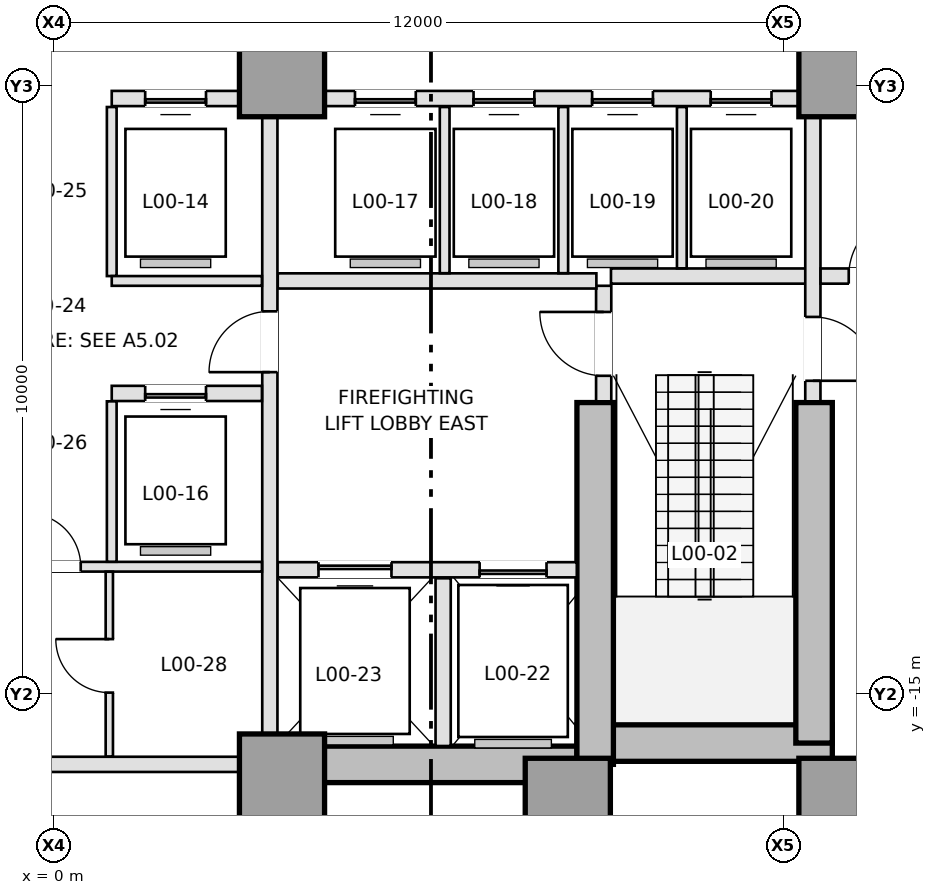
"""IFC4 building model, lengths in metres.
Left out: names, types, materials, properties, quantities, classifications, styles, units other than length and angle.
Written with IfcOpenShell. Run it as: python <this file> out.ifc"""

import sys

from ifc_helpers import new_model, si_unit, direction, frame, frame_2d, origin, origin_2d, place, context, subcontext, project, spatial, rectangle, extrude, element, fill, save


model = new_model("IFC4")
c1 = context("Model", 3, precision=1e-05, world=origin(), true_north=direction((0.0, 1.0)))
c2 = subcontext(c1, "Body", "Model", "MODEL_VIEW")
j1 = project(units=[si_unit("LENGTHUNIT", "METRE"), si_unit("PLANEANGLEUNIT", "RADIAN")], contexts=[c1])
p1 = place(None, origin())
s1 = spatial("IfcSite", under=j1, at=p1, CompositionType="ELEMENT")
p2 = place(p1, origin())
s2 = spatial("IfcBuilding", under=s1, at=p2, CompositionType="ELEMENT")
p3 = place(p2, origin())
s3 = spatial("IfcBuildingStorey", under=s2, at=p3, CompositionType="ELEMENT", Elevation=0.0)
p4 = place(p3, frame((3.75, -16.15, 0.0), z_axis=(0.0, 0.0, 1.0), x_axis=(1.0, 0.0, 0.0)))
e1 = element("IfcWall", 1, at=p4, inside=s3, PredefinedType="SHEAR", context=c2, shape_type="SweptSolid", body=[
    extrude(rectangle(XDim=5.15, YDim=0.6, at=frame_2d((2.575, 0.0))), origin(), (0.0, 0.0, 1.0), 5.0),
])
p5 = place(p3, frame((8.6, -15.8, 0.0), z_axis=(0.0, 0.0, 1.0), x_axis=(1.0, 0.0, 0.0)))
e2 = element("IfcWall", 2, at=p5, inside=s3, PredefinedType="SHEAR", context=c2, shape_type="SweptSolid", body=[
    extrude(rectangle(XDim=4.2, YDim=0.6, at=frame_2d((2.1, 0.0))), origin(), (0.0, 0.0, 1.0), 5.0),
])
p6 = place(p3, frame((12.5, -15.8, 0.0), z_axis=(0.0, 0.0, 1.0), x_axis=(0.0, 1.0, 0.0)))
e3 = element("IfcWall", 3, at=p6, inside=s3, PredefinedType="SHEAR", context=c2, shape_type="SweptSolid", body=[
    extrude(rectangle(XDim=5.6, YDim=0.6, at=frame_2d((2.8, 0.0))), origin(), (0.0, 0.0, 1.0), 5.0),
])
p7 = place(p3, frame((8.9, -16.15, 0.0), z_axis=(0.0, 0.0, 1.0), x_axis=(0.0, 1.0, 0.0)))
e4 = element("IfcWall", 4, at=p7, inside=s3, PredefinedType="SHEAR", context=c2, shape_type="SweptSolid", body=[
    extrude(rectangle(XDim=5.95, YDim=0.6, at=frame_2d((2.975, 0.0))), origin(), (0.0, 0.0, 1.0), 5.0),
])
for number, where, z_axis, x_axis in (
    (5, (3.75, -16.35, 0.0), (0.0, 0.0, 1.0), (1.0, 0.0, 0.0)),
    (6, (8.45, -16.75, 0.0), (0.0, 0.0, 1.0), (1.0, 0.0, 0.0)),
    (7, (12.95, -16.75, 0.0), (0.0, 0.0, 1.0), (1.0, 0.0, 0.0)),
    (8, (3.75, -4.8, 0.0), (0.0, 0.0, 1.0), (1.0, 0.0, 0.0)),
    (9, (12.95, -4.8, 0.0), (0.0, 0.0, 1.0), (1.0, 0.0, 0.0)),
):
    element("IfcColumn", number, at=place(p3, frame(where, z_axis=z_axis, x_axis=x_axis)), inside=s3, PredefinedType="COLUMN", context=c2, shape_type="SweptSolid", body=[
        extrude(rectangle(XDim=1.4, YDim=1.4, at=origin_2d()), origin(), (0.0, 0.0, 1.0), 5.0),
    ])
p8 = place(p3, frame((9.04, -10.18, 0.0), z_axis=(0.0, 0.0, 1.0), x_axis=(0.0, 1.0, 0.0)))
e10 = element("IfcWall", 10, at=p8, inside=s3, PredefinedType="PARTITIONING", context=c2, shape_type="SweptSolid", body=[
    extrude(rectangle(XDim=1.9, YDim=0.25, at=frame_2d((0.95, 0.0))), origin(), (0.0, 0.0, 1.0), 4.7),
])
p9 = place(p8, frame((0.42, 0.0, 0.0)))
e11 = element("IfcOpeningElement", 11, at=p9, cuts=e10, PredefinedType="OPENING", context=c2, shape_type="SweptSolid", body=[
    extrude(rectangle(XDim=1.05, YDim=2.15, at=frame_2d((0.525, 1.075))), frame((0.0, 0.135, 0.0), z_axis=(0.0, -1.0, 0.0), x_axis=(1.0, 0.0, 0.0)), (0.0, 0.0, 1.0), 0.27),
])
p10 = place(p3, frame((9.16, -8.12, 0.0), z_axis=(0.0, 0.0, 1.0), x_axis=(1.0, 0.0, 0.0)))
e12 = element("IfcWall", 12, at=p10, inside=s3, PredefinedType="PARTITIONING", context=c2, shape_type="SweptSolid", body=[
    extrude(rectangle(XDim=3.22, YDim=0.25, at=frame_2d((1.61, 0.0))), origin(), (0.0, 0.0, 1.0), 4.7),
])
p11 = place(p3, frame((12.48, -5.502, 0.0), z_axis=(0.0, 0.0, 1.0), x_axis=(0.0, -1.0, 0.0)))
e13 = element("IfcWall", 13, at=p11, inside=s3, PredefinedType="PARTITIONING", context=c2, shape_type="SweptSolid", body=[
    extrude(rectangle(XDim=4.678, YDim=0.25, at=frame_2d((2.339, 0.0))), origin(), (0.0, 0.0, 1.0), 4.7),
])
p12 = place(p11, frame((3.29, 0.0, 0.0)))
e14 = element("IfcOpeningElement", 14, at=p12, cuts=e13, PredefinedType="OPENING", context=c2, shape_type="SweptSolid", body=[
    extrude(rectangle(XDim=1.05, YDim=2.15, at=frame_2d((0.525, 1.075))), frame((0.0, 0.135, 0.0), z_axis=(0.0, -1.0, 0.0), x_axis=(1.0, 0.0, 0.0)), (0.0, 0.0, 1.0), 0.27),
])
p13 = place(p3, frame((3.68, -12.95, 0.0), z_axis=(0.0, 0.0, 1.0), x_axis=(1.0, 0.0, 0.0)))
e15 = element("IfcWall", 15, at=p13, inside=s3, PredefinedType="PARTITIONING", context=c2, shape_type="SweptSolid", body=[
    extrude(rectangle(XDim=4.918, YDim=0.25, at=frame_2d((2.459, 0.0))), origin(), (0.0, 0.0, 1.0), 4.7),
])
p14 = place(p13, frame((3.32, 0.0, 0.0)))
e16 = element("IfcOpeningElement", 16, at=p14, cuts=e15, PredefinedType="OPENING", context=c2, shape_type="SweptSolid", body=[
    extrude(rectangle(XDim=1.1, YDim=2.15, at=frame_2d((0.55, 1.075))), frame((0.0, 0.135, 0.0), z_axis=(0.0, -1.0, 0.0), x_axis=(1.0, 0.0, 0.0)), (0.0, 0.0, 1.0), 0.27),
])
p15 = place(p13, frame((0.67, 0.0, 0.0)))
e17 = element("IfcOpeningElement", 17, at=p15, cuts=e15, PredefinedType="OPENING", context=c2, shape_type="SweptSolid", body=[
    extrude(rectangle(XDim=1.2, YDim=2.15, at=frame_2d((0.6, 1.075))), frame((0.0, 0.135, 0.0), z_axis=(0.0, -1.0, 0.0), x_axis=(1.0, 0.0, 0.0)), (0.0, 0.0, 1.0), 0.27),
])
p16 = place(p3, frame((6.4, -15.848, 0.0), z_axis=(0.0, 0.0, 1.0), x_axis=(0.0, 1.0, 0.0)))
e18 = element("IfcWall", 18, at=p16, inside=s3, PredefinedType="PARTITIONING", context=c2, shape_type="SweptSolid", body=[
    extrude(rectangle(XDim=2.758, YDim=0.25, at=frame_2d((1.379, 0.0))), origin(), (0.0, 0.0, 1.0), 4.7),
])
p17 = place(p3, frame((3.68, -8.2, 0.0), z_axis=(0.0, 0.0, 1.0), x_axis=(1.0, 0.0, 0.0)))
e19 = element("IfcWall", 19, at=p17, inside=s3, PredefinedType="PARTITIONING", context=c2, shape_type="SweptSolid", body=[
    extrude(rectangle(XDim=5.24, YDim=0.25, at=frame_2d((2.62, 0.0))), origin(), (0.0, 0.0, 1.0), 4.7),
])
p18 = place(p3, frame((3.55, -15.648, 0.0), z_axis=(0.0, 0.0, 1.0), x_axis=(0.0, 1.0, 0.0)))
e20 = element("IfcWall", 20, at=p18, inside=s3, PredefinedType="PARTITIONING", context=c2, shape_type="SweptSolid", body=[
    extrude(rectangle(XDim=10.146, YDim=0.25, at=frame_2d((5.073, 0.0))), origin(), (0.0, 0.0, 1.0), 4.7),
])
p19 = place(p18, frame((5.948, 0.0, 0.0)))
e21 = element("IfcOpeningElement", 21, at=p19, cuts=e20, PredefinedType="OPENING", context=c2, shape_type="SweptSolid", body=[
    extrude(rectangle(XDim=1.0, YDim=2.15, at=frame_2d((0.5, 1.075))), frame((0.0, 0.135, 0.0), z_axis=(0.0, -1.0, 0.0), x_axis=(1.0, 0.0, 0.0)), (0.0, 0.0, 1.0), 0.27),
])
p20 = place(p3, frame((4.452, -5.2, 0.0), z_axis=(0.0, 0.0, 1.0), x_axis=(1.0, 0.0, 0.0)))
e22 = element("IfcWall", 22, at=p20, inside=s3, PredefinedType="PARTITIONING", context=c2, shape_type="SweptSolid", body=[
    extrude(rectangle(XDim=7.796, YDim=0.25, at=frame_2d((3.898, 0.0))), origin(), (0.0, 0.0, 1.0), 4.7),
])
p21 = place(p20, frame((0.498, 0.0, 0.0)))
e23 = element("IfcOpeningElement", 23, at=p21, cuts=e22, PredefinedType="OPENING", context=c2, shape_type="SweptSolid", body=[
    extrude(rectangle(XDim=1.0, YDim=2.15, at=frame_2d((0.5, 1.075))), frame((0.0, 0.135, 0.0), z_axis=(0.0, -1.0, 0.0), x_axis=(1.0, 0.0, 0.0)), (0.0, 0.0, 1.0), 0.27),
])
p22 = place(p20, frame((2.448, 0.0, 0.0)))
e24 = element("IfcOpeningElement", 24, at=p22, cuts=e22, PredefinedType="OPENING", context=c2, shape_type="SweptSolid", body=[
    extrude(rectangle(XDim=1.0, YDim=2.15, at=frame_2d((0.5, 1.075))), frame((0.0, 0.135, 0.0), z_axis=(0.0, -1.0, 0.0), x_axis=(1.0, 0.0, 0.0)), (0.0, 0.0, 1.0), 0.27),
])
p23 = place(p20, frame((4.398, 0.0, 0.0)))
e25 = element("IfcOpeningElement", 25, at=p23, cuts=e22, PredefinedType="OPENING", context=c2, shape_type="SweptSolid", body=[
    extrude(rectangle(XDim=1.0, YDim=2.15, at=frame_2d((0.5, 1.075))), frame((0.0, 0.135, 0.0), z_axis=(0.0, -1.0, 0.0), x_axis=(1.0, 0.0, 0.0)), (0.0, 0.0, 1.0), 0.27),
])
p24 = place(p20, frame((6.348, 0.0, 0.0)))
e26 = element("IfcOpeningElement", 26, at=p24, cuts=e22, PredefinedType="OPENING", context=c2, shape_type="SweptSolid", body=[
    extrude(rectangle(XDim=1.0, YDim=2.15, at=frame_2d((0.5, 1.075))), frame((0.0, 0.135, 0.0), z_axis=(0.0, -1.0, 0.0), x_axis=(1.0, 0.0, 0.0)), (0.0, 0.0, 1.0), 0.27),
])
p25 = place(p3, frame((0.95, -5.2, 0.0), z_axis=(0.0, 0.0, 1.0), x_axis=(1.0, 0.0, 0.0)))
e27 = element("IfcWall", 27, at=p25, inside=s3, PredefinedType="PARTITIONING", context=c2, shape_type="SweptSolid", body=[
    extrude(rectangle(XDim=2.098, YDim=0.25, at=frame_2d((1.049, 0.0))), origin(), (0.0, 0.0, 1.0), 4.7),
])
p26 = place(p25, frame((0.55, 0.0, 0.0)))
e28 = element("IfcOpeningElement", 28, at=p26, cuts=e27, PredefinedType="OPENING", context=c2, shape_type="SweptSolid", body=[
    extrude(rectangle(XDim=1.0, YDim=2.15, at=frame_2d((0.5, 1.075))), frame((0.0, 0.135, 0.0), z_axis=(0.0, -1.0, 0.0), x_axis=(1.0, 0.0, 0.0)), (0.0, 0.0, 1.0), 0.27),
])
for number, where, z_axis, x_axis in (
    (29, (6.425, -8.073, 0.0), (0.0, 0.0, 1.0), (0.0, 1.0, 0.0)),
    (30, (8.375, -8.073, 0.0), (0.0, 0.0, 1.0), (0.0, 1.0, 0.0)),
):
    element("IfcWall", number, at=place(p3, frame(where, z_axis=z_axis, x_axis=x_axis)), inside=s3, PredefinedType="PARTITIONING", context=c2, shape_type="SweptSolid", body=[
        extrude(rectangle(XDim=2.733, YDim=0.16, at=frame_2d((1.366, 0.0))), origin(), (0.0, 0.0, 1.0), 4.7),
    ])
p27 = place(p3, frame((10.325, -7.993, 0.0), z_axis=(0.0, 0.0, 1.0), x_axis=(0.0, 1.0, 0.0)))
e31 = element("IfcWall", 31, at=p27, inside=s3, PredefinedType="PARTITIONING", context=c2, shape_type="SweptSolid", body=[
    extrude(rectangle(XDim=2.653, YDim=0.16, at=frame_2d((1.326, 0.0))), origin(), (0.0, 0.0, 1.0), 4.7),
])
p28 = place(p3, frame((-3.048, -16.15, 0.0), z_axis=(0.0, 0.0, 1.0), x_axis=(1.0, 0.0, 0.0)))
e32 = element("IfcWall", 32, at=p28, inside=s3, PredefinedType="PARTITIONING", context=c2, shape_type="SweptSolid", body=[
    extrude(rectangle(XDim=6.096, YDim=0.25, at=frame_2d((3.048, 0.0))), origin(), (0.0, 0.0, 1.0), 3.676),
])
p29 = place(p3, frame((0.95, -8.12, 0.0), z_axis=(0.0, 0.0, 1.0), x_axis=(0.0, 1.0, 0.0)))
e33 = element("IfcWall", 33, at=p29, inside=s3, PredefinedType="PARTITIONING", context=c2, shape_type="SweptSolid", body=[
    extrude(rectangle(XDim=2.78, YDim=0.16, at=frame_2d((1.39, 0.0))), origin(), (0.0, 0.0, 1.0), 4.7),
])
p30 = place(p3, frame((0.95, -8.2, 0.0), z_axis=(0.0, 0.0, 1.0), x_axis=(1.0, 0.0, 0.0)))
e34 = element("IfcWall", 34, at=p30, inside=s3, PredefinedType="PARTITIONING", context=c2, shape_type="SweptSolid", body=[
    extrude(rectangle(XDim=2.47, YDim=0.16, at=frame_2d((1.235, 0.0))), origin(), (0.0, 0.0, 1.0), 4.7),
])
p31 = place(p3, frame((0.95, -10.05, 0.0), z_axis=(0.0, 0.0, 1.0), x_axis=(1.0, 0.0, 0.0)))
e35 = element("IfcWall", 35, at=p31, inside=s3, PredefinedType="PARTITIONING", context=c2, shape_type="SweptSolid", body=[
    extrude(rectangle(XDim=2.47, YDim=0.25, at=frame_2d((1.235, 0.0))), origin(), (0.0, 0.0, 1.0), 4.7),
])
p32 = place(p31, frame((0.55, 0.0, 0.0)))
e36 = element("IfcOpeningElement", 36, at=p32, cuts=e35, PredefinedType="OPENING", context=c2, shape_type="SweptSolid", body=[
    extrude(rectangle(XDim=1.0, YDim=2.15, at=frame_2d((0.5, 1.075))), frame((0.0, 0.135, 0.0), z_axis=(0.0, -1.0, 0.0), x_axis=(1.0, 0.0, 0.0)), (0.0, 0.0, 1.0), 0.27),
])
p33 = place(p3, frame((-3.42, -12.9, 0.0), z_axis=(0.0, 0.0, 1.0), x_axis=(1.0, 0.0, 0.0)))
e37 = element("IfcWall", 37, at=p33, inside=s3, PredefinedType="PARTITIONING", context=c2, shape_type="SweptSolid", body=[
    extrude(rectangle(XDim=6.84, YDim=0.16, at=frame_2d((3.42, 0.0))), origin(), (0.0, 0.0, 1.0), 4.7),
])
p34 = place(p33, frame((2.98, 0.0, 0.0)))
e38 = element("IfcOpeningElement", 38, at=p34, cuts=e37, PredefinedType="OPENING", context=c2, shape_type="SweptSolid", body=[
    extrude(rectangle(XDim=0.88, YDim=2.12, at=frame_2d((0.44, 1.06))), frame((0.0, 0.09, 0.0), z_axis=(0.0, -1.0, 0.0), x_axis=(1.0, 0.0, 0.0)), (0.0, 0.0, 1.0), 0.18),
])
p35 = place(p3, frame((0.95, -12.818, 0.0), z_axis=(0.0, 0.0, 1.0), x_axis=(0.0, 1.0, 0.0)))
e39 = element("IfcWall", 39, at=p35, inside=s3, PredefinedType="PARTITIONING", context=c2, shape_type="SweptSolid", body=[
    extrude(rectangle(XDim=2.638, YDim=0.16, at=frame_2d((1.319, 0.0))), origin(), (0.0, 0.0, 1.0), 4.7),
])
p36 = place(p3, frame((0.91, -16.02, 0.0), z_axis=(0.0, 0.0, 1.0), x_axis=(0.0, 1.0, 0.0)))
e40 = element("IfcWall", 40, at=p36, inside=s3, PredefinedType="PARTITIONING", context=c2, shape_type="SweptSolid", body=[
    extrude(rectangle(XDim=3.038, YDim=0.12, at=frame_2d((1.519, 0.0))), origin(), (0.0, 0.0, 1.0), 4.7),
])
p37 = place(p36, frame((1.05, 0.0, 0.0)))
e41 = element("IfcOpeningElement", 41, at=p37, cuts=e40, PredefinedType="OPENING", context=c2, shape_type="SweptSolid", body=[
    extrude(rectangle(XDim=0.88, YDim=2.12, at=frame_2d((0.44, 1.06))), frame((0.0, 0.07, 0.0), z_axis=(0.0, -1.0, 0.0), x_axis=(1.0, 0.0, 0.0)), (0.0, 0.0, 1.0), 0.14),
])
p38 = place(p3, frame((12.607, -8.12, 0.0), z_axis=(0.0, 0.0, 1.0), x_axis=(1.0, 0.0, 0.0)))
e42 = element("IfcWall", 42, at=p38, inside=s3, PredefinedType="PARTITIONING", context=c2, shape_type="SweptSolid", body=[
    extrude(rectangle(XDim=2.113, YDim=0.25, at=frame_2d((1.057, 0.0))), origin(), (0.0, 0.0, 1.0), 4.7),
])
p39 = place(p38, frame((0.463, 0.0, 0.0)))
e43 = element("IfcOpeningElement", 43, at=p39, cuts=e42, PredefinedType="OPENING", context=c2, shape_type="SweptSolid", body=[
    extrude(rectangle(XDim=1.05, YDim=2.15, at=frame_2d((0.525, 1.075))), frame((0.0, 0.135, 0.0), z_axis=(0.0, -1.0, 0.0), x_axis=(1.0, 0.0, 0.0)), (0.0, 0.0, 1.0), 0.27),
])
p40 = place(p26, origin())
e44 = element("IfcDoor", 44, at=p40, inside=s3, OperationType="SLIDING_TO_RIGHT", PredefinedType="DOOR", context=c2, shape_type="SweptSolid", body=[
    extrude(rectangle(XDim=1.0, YDim=2.15, at=frame_2d((0.5, 1.075))), frame((0.0, 0.025, 0.0), z_axis=(0.0, -1.0, 0.0), x_axis=(1.0, 0.0, 0.0)), (0.0, 0.0, 1.0), 0.05),
])
fill(e28, e44)
p41 = place(p21, origin())
e45 = element("IfcDoor", 45, at=p41, inside=s3, OperationType="SLIDING_TO_RIGHT", PredefinedType="DOOR", context=c2, shape_type="SweptSolid", body=[
    extrude(rectangle(XDim=1.0, YDim=2.15, at=frame_2d((0.5, 1.075))), frame((0.0, 0.025, 0.0), z_axis=(0.0, -1.0, 0.0), x_axis=(1.0, 0.0, 0.0)), (0.0, 0.0, 1.0), 0.05),
])
fill(e23, e45)
p42 = place(p22, origin())
e46 = element("IfcDoor", 46, at=p42, inside=s3, OperationType="SLIDING_TO_RIGHT", PredefinedType="DOOR", context=c2, shape_type="SweptSolid", body=[
    extrude(rectangle(XDim=1.0, YDim=2.15, at=frame_2d((0.5, 1.075))), frame((0.0, 0.025, 0.0), z_axis=(0.0, -1.0, 0.0), x_axis=(1.0, 0.0, 0.0)), (0.0, 0.0, 1.0), 0.05),
])
fill(e24, e46)
p43 = place(p23, origin())
e47 = element("IfcDoor", 47, at=p43, inside=s3, OperationType="SLIDING_TO_RIGHT", PredefinedType="DOOR", context=c2, shape_type="SweptSolid", body=[
    extrude(rectangle(XDim=1.0, YDim=2.15, at=frame_2d((0.5, 1.075))), frame((0.0, 0.025, 0.0), z_axis=(0.0, -1.0, 0.0), x_axis=(1.0, 0.0, 0.0)), (0.0, 0.0, 1.0), 0.05),
])
fill(e25, e47)
p44 = place(p24, origin())
e48 = element("IfcDoor", 48, at=p44, inside=s3, OperationType="SLIDING_TO_RIGHT", PredefinedType="DOOR", context=c2, shape_type="SweptSolid", body=[
    extrude(rectangle(XDim=1.0, YDim=2.15, at=frame_2d((0.5, 1.075))), frame((0.0, 0.025, 0.0), z_axis=(0.0, -1.0, 0.0), x_axis=(1.0, 0.0, 0.0)), (0.0, 0.0, 1.0), 0.05),
])
fill(e26, e48)
p45 = place(p14, origin())
e49 = element("IfcDoor", 49, at=p45, inside=s3, OperationType="SLIDING_TO_RIGHT", PredefinedType="DOOR", context=c2, shape_type="SweptSolid", body=[
    extrude(rectangle(XDim=1.1, YDim=2.15, at=frame_2d((0.55, 1.075))), frame((0.0, 0.025, 0.0), z_axis=(0.0, -1.0, 0.0), x_axis=(1.0, 0.0, 0.0)), (0.0, 0.0, 1.0), 0.05),
])
fill(e16, e49)
p46 = place(p15, origin())
e50 = element("IfcDoor", 50, at=p46, inside=s3, OperationType="SLIDING_TO_LEFT", PredefinedType="DOOR", context=c2, shape_type="SweptSolid", body=[
    extrude(rectangle(XDim=1.2, YDim=2.15, at=frame_2d((0.6, 1.075))), frame((0.0, 0.025, 0.0), z_axis=(0.0, -1.0, 0.0), x_axis=(1.0, 0.0, 0.0)), (0.0, 0.0, 1.0), 0.05),
])
fill(e17, e50)
p47 = place(p32, origin())
e51 = element("IfcDoor", 51, at=p47, inside=s3, OperationType="SLIDING_TO_RIGHT", PredefinedType="DOOR", context=c2, shape_type="SweptSolid", body=[
    extrude(rectangle(XDim=1.0, YDim=2.15, at=frame_2d((0.5, 1.075))), frame((0.0, 0.025, 0.0), z_axis=(0.0, -1.0, 0.0), x_axis=(1.0, 0.0, 0.0)), (0.0, 0.0, 1.0), 0.05),
])
fill(e36, e51)
p48 = place(p9, origin())
e52 = element("IfcDoor", 52, at=p48, inside=s3, OperationType="SINGLE_SWING_RIGHT", PredefinedType="DOOR", context=c2, shape_type="SweptSolid", body=[
    extrude(rectangle(XDim=1.05, YDim=2.15, at=frame_2d((0.525, 1.075))), frame((0.0, 0.025, 0.0), z_axis=(0.0, -1.0, 0.0), x_axis=(1.0, 0.0, 0.0)), (0.0, 0.0, 1.0), 0.05),
])
fill(e11, e52)
p49 = place(p19, origin())
e53 = element("IfcDoor", 53, at=p49, inside=s3, OperationType="SINGLE_SWING_LEFT", PredefinedType="DOOR", context=c2, shape_type="SweptSolid", body=[
    extrude(rectangle(XDim=1.0, YDim=2.15, at=frame_2d((0.5, 1.075))), frame((0.0, 0.025, 0.0), z_axis=(0.0, -1.0, 0.0), x_axis=(1.0, 0.0, 0.0)), (0.0, 0.0, 1.0), 0.05),
])
fill(e21, e53)
p50 = place(p34, origin())
e54 = element("IfcDoor", 54, at=p50, inside=s3, OperationType="SINGLE_SWING_LEFT", PredefinedType="DOOR", context=c2, shape_type="SweptSolid", body=[
    extrude(rectangle(XDim=0.88, YDim=2.12, at=frame_2d((0.44, 1.06))), frame((0.0, 0.025, 0.0), z_axis=(0.0, -1.0, 0.0), x_axis=(1.0, 0.0, 0.0)), (0.0, 0.0, 1.0), 0.05),
])
fill(e38, e54)
p51 = place(p37, origin())
e55 = element("IfcDoor", 55, at=p51, inside=s3, OperationType="SINGLE_SWING_RIGHT", PredefinedType="DOOR", context=c2, shape_type="SweptSolid", body=[
    extrude(rectangle(XDim=0.88, YDim=2.12, at=frame_2d((0.44, 1.06))), frame((0.0, 0.025, 0.0), z_axis=(0.0, -1.0, 0.0), x_axis=(1.0, 0.0, 0.0)), (0.0, 0.0, 1.0), 0.05),
])
fill(e41, e55)
p52 = place(p39, origin())
e56 = element("IfcDoor", 56, at=p52, inside=s3, OperationType="SINGLE_SWING_RIGHT", PredefinedType="DOOR", context=c2, shape_type="SweptSolid", body=[
    extrude(rectangle(XDim=1.05, YDim=2.15, at=frame_2d((0.525, 1.075))), frame((0.0, 0.025, 0.0), z_axis=(0.0, -1.0, 0.0), x_axis=(1.0, 0.0, 0.0)), (0.0, 0.0, 1.0), 0.05),
])
fill(e43, e56)
p53 = place(p12, origin())
e57 = element("IfcDoor", 57, at=p53, inside=s3, OperationType="SINGLE_SWING_RIGHT", PredefinedType="DOOR", context=c2, shape_type="SweptSolid", body=[
    extrude(rectangle(XDim=1.05, YDim=2.15, at=frame_2d((0.525, 1.075))), frame((0.0, 0.025, 0.0), z_axis=(0.0, -1.0, 0.0), x_axis=(1.0, 0.0, 0.0)), (0.0, 0.0, 1.0), 0.05),
])
fill(e14, e57)
save(model, sys.argv[1])
